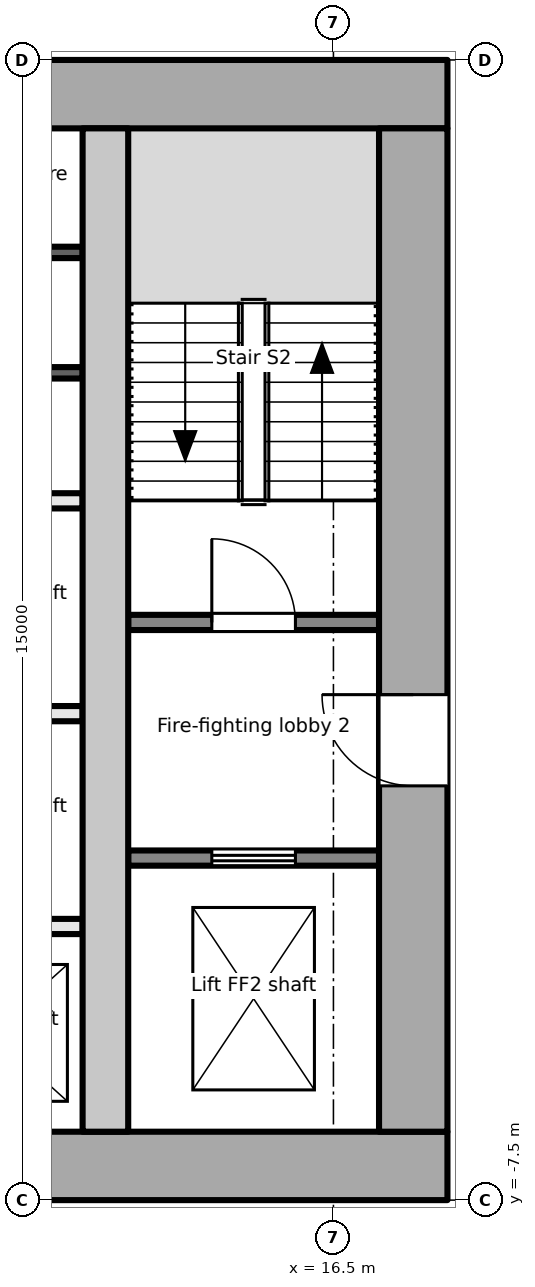
"""IFC4 building model, lengths in metres.
Left out: names, types, materials, properties, quantities, classifications, styles, units other than length and angle.
Written with IfcOpenShell. Run it as: python <this file> out.ifc"""

import sys

from ifc_helpers import new_model, si_unit, direction, frame, frame_2d, origin, place, context, subcontext, project, spatial, rectangle, extrude, element, fill, save


model = new_model("IFC4")
c1 = context("Model", 3, precision=1e-05, world=origin(), true_north=direction((0.0, 1.0)))
c2 = subcontext(c1, "Body", "Model", "MODEL_VIEW")
j1 = project(units=[si_unit("LENGTHUNIT", "METRE"), si_unit("PLANEANGLEUNIT", "RADIAN")], contexts=[c1])
p1 = place(None, origin())
s1 = spatial("IfcSite", under=j1, at=p1, CompositionType="ELEMENT")
p2 = place(p1, origin())
s2 = spatial("IfcBuilding", under=s1, at=p2, CompositionType="ELEMENT")
p3 = place(p2, frame((0.0, 0.0, 40.6)))
s3 = spatial("IfcBuildingStorey", under=s2, at=p3, CompositionType="ELEMENT", Elevation=40.6)
p4 = place(p3, frame((-18.0, -7.05, -0.2), z_axis=(0.0, 0.0, 1.0), x_axis=(1.0, 0.0, 0.0)))
e1 = element("IfcWall", 1, at=p4, inside=s3, PredefinedType="SHEAR", context=c2, shape_type="SweptSolid", body=[
    extrude(rectangle(XDim=36.0, YDim=0.9, at=frame_2d((18.0, 0.0))), origin(), (0.0, 0.0, 1.0), 4.1),
])
p5 = place(p4, frame((7.8, 0.0, 0.2)))
e2 = element("IfcOpeningElement", 2, at=p5, cuts=e1, PredefinedType="OPENING", context=c2, shape_type="SweptSolid", body=[
    extrude(rectangle(XDim=2.4, YDim=2.1, at=frame_2d((1.2, 1.05))), frame((0.0, 0.46, 0.0), z_axis=(0.0, -1.0, 0.0), x_axis=(1.0, 0.0, 0.0)), (0.0, 0.0, 1.0), 0.921),
])
p6 = place(p4, frame((17.4, 0.0, 0.2)))
e3 = element("IfcOpeningElement", 3, at=p6, cuts=e1, PredefinedType="OPENING", context=c2, shape_type="SweptSolid", body=[
    extrude(rectangle(XDim=1.2, YDim=2.1, at=frame_2d((0.6, 1.05))), frame((0.0, 0.46, 0.0), z_axis=(0.0, -1.0, 0.0), x_axis=(1.0, 0.0, 0.0)), (0.0, 0.0, 1.0), 0.921),
])
p7 = place(p4, frame((26.1, 0.0, 0.2)))
e4 = element("IfcOpeningElement", 4, at=p7, cuts=e1, PredefinedType="OPENING", context=c2, shape_type="SweptSolid", body=[
    extrude(rectangle(XDim=2.4, YDim=2.1, at=frame_2d((1.2, 1.05))), frame((0.0, 0.46, 0.0), z_axis=(0.0, -1.0, 0.0), x_axis=(1.0, 0.0, 0.0)), (0.0, 0.0, 1.0), 0.921),
])
p8 = place(p3, frame((-18.0, 7.05, -0.2), z_axis=(0.0, 0.0, 1.0), x_axis=(1.0, 0.0, 0.0)))
e5 = element("IfcWall", 5, at=p8, inside=s3, PredefinedType="SHEAR", context=c2, shape_type="SweptSolid", body=[
    extrude(rectangle(XDim=36.0, YDim=0.9, at=frame_2d((18.0, 0.0))), origin(), (0.0, 0.0, 1.0), 4.1),
])
p9 = place(p3, frame((17.55, -6.6, -0.2), z_axis=(0.0, 0.0, 1.0), x_axis=(0.0, 1.0, 0.0)))
e6 = element("IfcWall", 6, at=p9, inside=s3, PredefinedType="SHEAR", context=c2, shape_type="SweptSolid", body=[
    extrude(rectangle(XDim=13.2, YDim=0.9, at=frame_2d((6.6, 0.0))), origin(), (0.0, 0.0, 1.0), 4.1),
])
p10 = place(p9, frame((4.55, 0.0, 0.2)))
e7 = element("IfcOpeningElement", 7, at=p10, cuts=e6, PredefinedType="OPENING", context=c2, shape_type="SweptSolid", body=[
    extrude(rectangle(XDim=1.2, YDim=2.1, at=frame_2d((0.6, 1.05))), frame((0.0, 0.46, 0.0), z_axis=(0.0, -1.0, 0.0), x_axis=(1.0, 0.0, 0.0)), (0.0, 0.0, 1.0), 0.921),
])
p11 = place(p3, frame((13.5, -6.6, -0.2), z_axis=(0.0, 0.0, 1.0), x_axis=(0.0, 1.0, 0.0)))
e8 = element("IfcWall", 8, at=p11, inside=s3, PredefinedType="SHEAR", context=c2, shape_type="SweptSolid", body=[
    extrude(rectangle(XDim=13.2, YDim=0.6, at=frame_2d((6.6, 0.0))), origin(), (0.0, 0.0, 1.0), 4.1),
])
p12 = place(p3, frame((13.8, -3.0, 0.0), z_axis=(0.0, 0.0, 1.0), x_axis=(1.0, 0.0, 0.0)))
e9 = element("IfcWall", 9, at=p12, inside=s3, PredefinedType="PARTITIONING", context=c2, shape_type="SweptSolid", body=[
    extrude(rectangle(XDim=3.3, YDim=0.2, at=frame_2d((1.65, 0.0))), origin(), (0.0, 0.0, 1.0), 3.9),
])
p13 = place(p12, frame((1.1, 0.0, 0.0)))
e10 = element("IfcOpeningElement", 10, at=p13, cuts=e9, PredefinedType="OPENING", context=c2, shape_type="SweptSolid", body=[
    extrude(rectangle(XDim=1.1, YDim=2.1, at=frame_2d((0.55, 1.05))), frame((0.0, 0.111, 0.0), z_axis=(0.0, -1.0, 0.0), x_axis=(1.0, 0.0, 0.0)), (0.0, 0.0, 1.0), 0.221),
])
p14 = place(p3, frame((13.8, 0.1, 0.0), z_axis=(0.0, 0.0, 1.0), x_axis=(1.0, 0.0, 0.0)))
e11 = element("IfcWall", 11, at=p14, inside=s3, PredefinedType="PARTITIONING", context=c2, shape_type="SweptSolid", body=[
    extrude(rectangle(XDim=3.3, YDim=0.2, at=frame_2d((1.65, 0.0))), origin(), (0.0, 0.0, 1.0), 3.9),
])
p15 = place(p14, frame((1.1, 0.0, 0.0)))
e12 = element("IfcOpeningElement", 12, at=p15, cuts=e11, PredefinedType="OPENING", context=c2, shape_type="SweptSolid", body=[
    extrude(rectangle(XDim=1.1, YDim=2.1, at=frame_2d((0.55, 1.05))), frame((0.0, 0.111, 0.0), z_axis=(0.0, -1.0, 0.0), x_axis=(1.0, 0.0, 0.0)), (0.0, 0.0, 1.0), 0.221),
])
for number, where, z_axis, x_axis in (
    (13, (10.9, -3.9, 0.0), (0.0, 0.0, 1.0), (1.0, 0.0, 0.0)),
    (14, (10.9, -1.1, 0.0), (0.0, 0.0, 1.0), (1.0, 0.0, 0.0)),
    (15, (10.9, 1.7, 0.0), (0.0, 0.0, 1.0), (1.0, 0.0, 0.0)),
):
    element("IfcWall", number, at=place(p3, frame(where, z_axis=z_axis, x_axis=x_axis)), inside=s3, PredefinedType="PARTITIONING", context=c2, shape_type="SweptSolid", body=[
        extrude(rectangle(XDim=2.3, YDim=0.2, at=frame_2d((1.15, 0.0))), origin(), (0.0, 0.0, 1.0), 3.9),
    ])
for number, where, z_axis, x_axis in (
    (16, (10.9, 3.384, 0.0), (0.0, 0.0, 1.0), (1.0, 0.0, 0.0)),
    (17, (10.9, 4.968, 0.0), (0.0, 0.0, 1.0), (1.0, 0.0, 0.0)),
):
    element("IfcWall", number, at=place(p3, frame(where, z_axis=z_axis, x_axis=x_axis)), inside=s3, PredefinedType="PARTITIONING", context=c2, shape_type="SweptSolid", body=[
        extrude(rectangle(XDim=2.3, YDim=0.15, at=frame_2d((1.15, 0.0))), origin(), (0.0, 0.0, 1.0), 3.9),
    ])
p16 = place(p13, origin())
e18 = element("IfcDoor", 18, at=p16, inside=s3, OperationType="DOUBLE_DOOR_SLIDING", PredefinedType="DOOR", context=c2, shape_type="SweptSolid", body=[
    extrude(rectangle(XDim=1.1, YDim=2.1, at=frame_2d((0.55, 1.05))), frame((0.0, 0.025, 0.0), z_axis=(0.0, -1.0, 0.0), x_axis=(1.0, 0.0, 0.0)), (0.0, 0.0, 1.0), 0.05),
])
fill(e10, e18)
p17 = place(p10, origin())
e19 = element("IfcDoor", 19, at=p17, inside=s3, OperationType="SINGLE_SWING_RIGHT", PredefinedType="DOOR", context=c2, shape_type="SweptSolid", body=[
    extrude(rectangle(XDim=1.2, YDim=2.1, at=frame_2d((0.6, 1.05))), frame((0.0, 0.025, 0.0), z_axis=(0.0, -1.0, 0.0), x_axis=(1.0, 0.0, 0.0)), (0.0, 0.0, 1.0), 0.05),
])
fill(e7, e19)
p18 = place(p15, origin())
e20 = element("IfcDoor", 20, at=p18, inside=s3, OperationType="SINGLE_SWING_LEFT", PredefinedType="DOOR", context=c2, shape_type="SweptSolid", body=[
    extrude(rectangle(XDim=1.1, YDim=2.1, at=frame_2d((0.55, 1.05))), frame((0.0, 0.025, 0.0), z_axis=(0.0, -1.0, 0.0), x_axis=(1.0, 0.0, 0.0)), (0.0, 0.0, 1.0), 0.05),
])
fill(e12, e20)
save(model, sys.argv[1])
